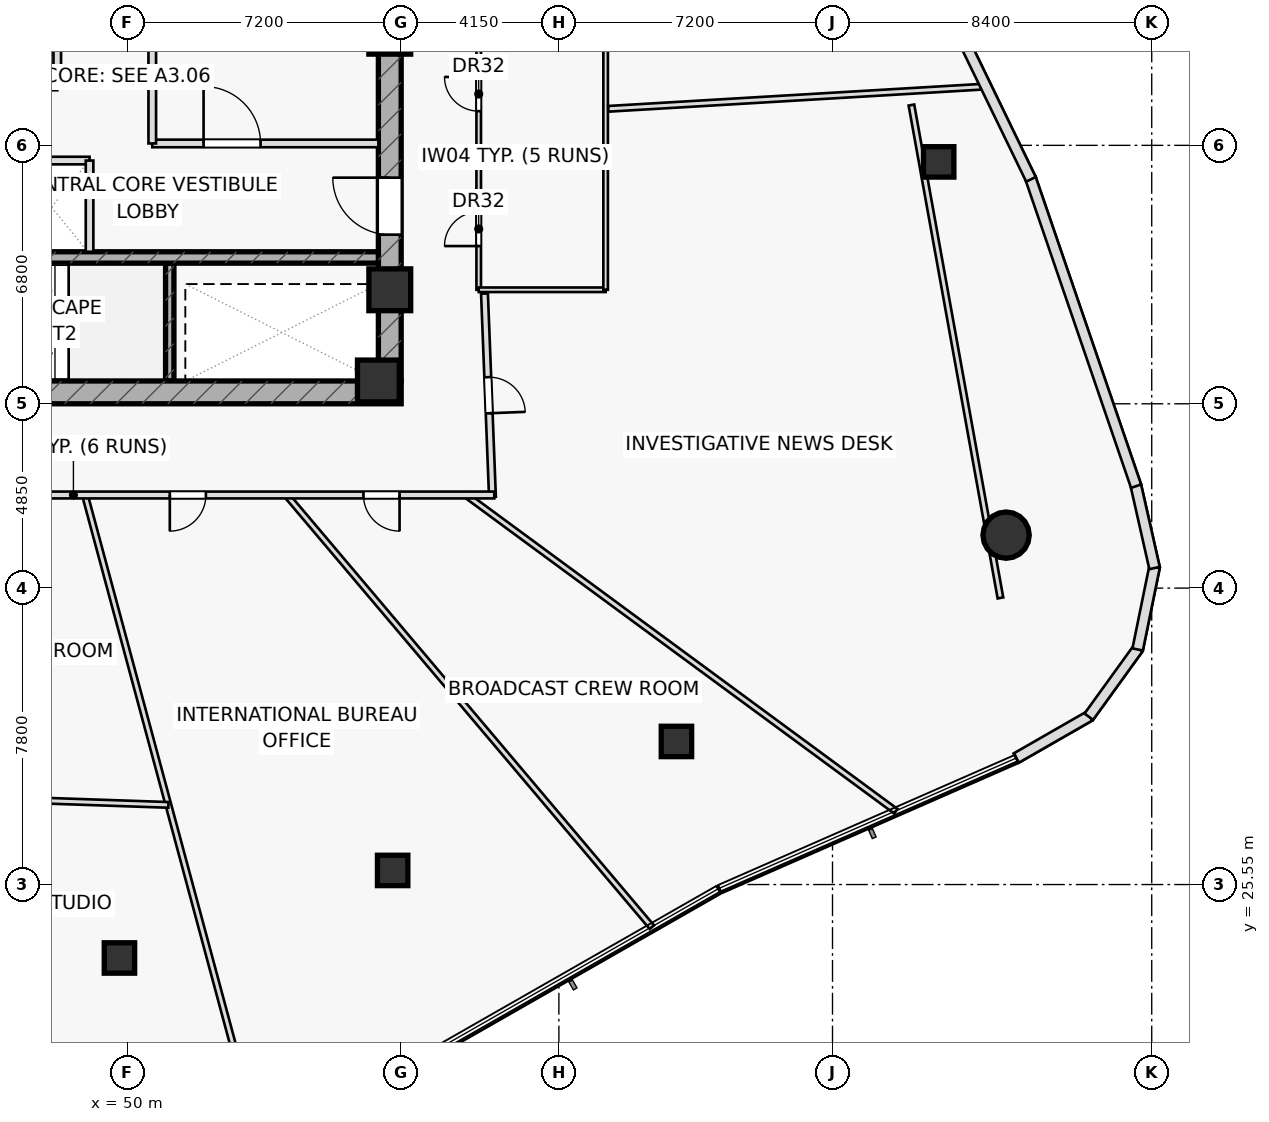
"""IFC4 building model, lengths in metres.
Left out: names, types, materials, properties, quantities, classifications, styles, units other than length and angle.
Written with IfcOpenShell. Run it as: python <this file> out.ifc"""

import sys

from ifc_helpers import new_model, si_unit, direction, frame, frame_2d, origin, origin_2d, place, context, subcontext, project, spatial, rectangle, hollow_rectangle, hollow_circle, extrude, element, fill, save


model = new_model("IFC4")
c1 = context("Model", 3, precision=1e-05, world=origin(), true_north=direction((0.0, 1.0)))
c2 = subcontext(c1, "Body", "Model", "MODEL_VIEW")
j1 = project(units=[si_unit("LENGTHUNIT", "METRE"), si_unit("PLANEANGLEUNIT", "RADIAN")], contexts=[c1])
p1 = place(None, origin())
s1 = spatial("IfcSite", under=j1, at=p1, CompositionType="ELEMENT")
p2 = place(p1, origin())
s2 = spatial("IfcBuilding", under=s1, at=p2, CompositionType="ELEMENT")
p3 = place(p2, frame((0.0, 0.0, 51.0)))
s3 = spatial("IfcBuildingStorey", under=s2, at=p3, CompositionType="ELEMENT", Elevation=51.0)
p4 = place(p3, frame((51.11, 38.8, 0.0), z_axis=(0.0, 0.0, 1.0), x_axis=(0.0, 1.0, 0.0)))
e1 = element("IfcWall", 1, at=p4, inside=s3, PredefinedType="SHEAR", context=c2, shape_type="SweptSolid", body=[
    extrude(rectangle(XDim=3.1, YDim=0.22, at=frame_2d((1.55, 0.0))), origin(), (0.0, 0.0, 1.0), 3.6),
])
p5 = place(p3, frame((42.8, 38.5, 0.0), z_axis=(0.0, 0.0, 1.0), x_axis=(1.0, 0.0, 0.0)))
e2 = element("IfcWall", 2, at=p5, inside=s3, PredefinedType="SHEAR", context=c2, shape_type="SweptSolid", body=[
    extrude(rectangle(XDim=14.4, YDim=0.6, at=frame_2d((7.2, 0.0))), origin(), (0.0, 0.0, 1.0), 3.6),
])
p6 = place(p5, frame((0.88, 0.0, 0.0)))
e3 = element("IfcOpeningElement", 3, at=p6, cuts=e2, PredefinedType="OPENING", context=c2, shape_type="SweptSolid", body=[
    extrude(rectangle(XDim=1.05, YDim=2.2, at=frame_2d((0.525, 1.1))), frame((0.0, 0.31, 0.0), z_axis=(0.0, -1.0, 0.0), x_axis=(1.0, 0.0, 0.0)), (0.0, 0.0, 1.0), 0.62),
])
p7 = place(p3, frame((56.9, 38.8, 0.0), z_axis=(0.0, 0.0, 1.0), x_axis=(0.0, 1.0, 0.0)))
e4 = element("IfcWall", 4, at=p7, inside=s3, PredefinedType="SHEAR", context=c2, shape_type="SweptSolid", body=[
    extrude(rectangle(XDim=12.4, YDim=0.6, at=frame_2d((6.2, 0.0))), origin(), (0.0, 0.0, 1.0), 3.6),
])
p8 = place(p7, frame((3.85, 0.0, 0.0)))
e5 = element("IfcOpeningElement", 5, at=p8, cuts=e4, PredefinedType="OPENING", context=c2, shape_type="SweptSolid", body=[
    extrude(rectangle(XDim=1.5, YDim=2.2, at=frame_2d((0.75, 1.1))), frame((0.0, 0.31, 0.0), z_axis=(0.0, -1.0, 0.0), x_axis=(1.0, 0.0, 0.0)), (0.0, 0.0, 1.0), 0.62),
])
p9 = place(p3, frame((43.4, 42.05, 0.0), z_axis=(0.0, 0.0, 1.0), x_axis=(1.0, 0.0, 0.0)))
e6 = element("IfcWall", 6, at=p9, inside=s3, PredefinedType="SHEAR", context=c2, shape_type="SweptSolid", body=[
    extrude(rectangle(XDim=13.2, YDim=0.3, at=frame_2d((6.6, 0.0))), origin(), (0.0, 0.0, 1.0), 3.6),
])
for number, where, z_axis, x_axis in (
    (7, (56.9, 47.95, 0.0), (0.0, 0.0, 1.0), (1.0, 0.0, 0.0)),
    (8, (56.9, 41.2, 0.0), (0.0, 0.0, 1.0), (1.0, 0.0, 0.0)),
    (9, (56.6, 38.8, 0.0), (0.0, 0.0, 1.0), (1.0, 0.0, 0.0)),
):
    element("IfcColumn", number, at=place(p3, frame(where, z_axis=z_axis, x_axis=x_axis)), inside=s3, PredefinedType="COLUMN", context=c2, shape_type="SweptSolid", body=[
        extrude(rectangle(XDim=1.1, YDim=1.1, at=origin_2d()), origin(), (0.0, 0.0, 1.0), 3.6),
    ])
for number, where, z_axis, x_axis in (
    (10, (49.787, 23.618, 0.0), (0.0, 0.0, 1.0), (1.0, 0.0, 0.0)),
    (11, (56.975, 25.921, 0.0), (0.0, 0.0, 1.0), (1.0, 0.0, 0.0)),
    (12, (64.444, 29.315, 0.0), (0.0, 0.0, 1.0), (1.0, 0.0, 0.0)),
):
    element("IfcColumn", number, at=place(p3, frame(where, z_axis=z_axis, x_axis=x_axis)), inside=s3, PredefinedType="COLUMN", context=c2, shape_type="SweptSolid", body=[
        extrude(hollow_rectangle(XDim=0.8, YDim=0.8, WallThickness=0.045, at=origin_2d()), origin(), (0.0, 0.0, 1.0), 3.6),
    ])
p10 = place(p3, frame((73.118, 34.744, 0.0), z_axis=(0.0, 0.0, 1.0), x_axis=(1.0, 0.0, 0.0)))
e13 = element("IfcColumn", 13, at=p10, inside=s3, PredefinedType="COLUMN", context=c2, shape_type="SweptSolid", body=[
    extrude(hollow_circle(Radius=0.61, WallThickness=0.05, at=origin_2d()), origin(), (0.0, 0.0, 1.0), 3.6),
])
p11 = place(p3, frame((71.344, 44.565, 0.0), z_axis=(0.0, 0.0, 1.0), x_axis=(1.0, 0.0, 0.0)))
e14 = element("IfcColumn", 14, at=p11, inside=s3, PredefinedType="COLUMN", context=c2, shape_type="SweptSolid", body=[
    extrude(hollow_rectangle(XDim=0.8, YDim=0.8, WallThickness=0.045, at=origin_2d()), origin(), (0.0, 0.0, 1.0), 3.6),
])
p12 = place(p3, frame((45.75, 46.55, 0.0), z_axis=(0.0, 0.0, 1.0), x_axis=(1.0, 0.0, 0.0)))
e15 = element("IfcWall", 15, at=p12, inside=s3, PredefinedType="PARTITIONING", context=c2, shape_type="SweptSolid", body=[
    extrude(rectangle(XDim=2.4, YDim=0.2, at=frame_2d((1.2, 0.0))), origin(), (0.0, 0.0, 1.0), 3.6),
])
p13 = place(p3, frame((48.15, 46.55, 0.0), z_axis=(0.0, 0.0, 1.0), x_axis=(0.0, 1.0, 0.0)))
e16 = element("IfcWall", 16, at=p13, inside=s3, PredefinedType="PARTITIONING", context=c2, shape_type="SweptSolid", body=[
    extrude(rectangle(XDim=1.25, YDim=0.2, at=frame_2d((0.625, 0.0))), origin(), (0.0, 0.0, 1.0), 3.6),
])
p14 = place(p3, frame((46.95, 44.6, 0.0), z_axis=(0.0, 0.0, 1.0), x_axis=(1.0, 0.0, 0.0)))
e17 = element("IfcWall", 17, at=p14, inside=s3, PredefinedType="PARTITIONING", context=c2, shape_type="SweptSolid", body=[
    extrude(rectangle(XDim=2.05, YDim=0.2, at=frame_2d((1.025, 0.0))), origin(), (0.0, 0.0, 1.0), 3.6),
])
p15 = place(p3, frame((50.65, 45.05, 0.0), z_axis=(0.0, 0.0, 1.0), x_axis=(1.0, 0.0, 0.0)))
e18 = element("IfcWall", 18, at=p15, inside=s3, PredefinedType="PARTITIONING", context=c2, shape_type="SweptSolid", body=[
    extrude(rectangle(XDim=5.95, YDim=0.2, at=frame_2d((2.975, 0.0))), origin(), (0.0, 0.0, 1.0), 3.6),
])
p16 = place(p15, frame((1.35, 0.0, 0.0)))
e19 = element("IfcOpeningElement", 19, at=p16, cuts=e18, PredefinedType="OPENING", context=c2, shape_type="SweptSolid", body=[
    extrude(rectangle(XDim=1.5, YDim=2.2, at=frame_2d((0.75, 1.1))), frame((0.0, 0.11, 0.0), z_axis=(0.0, -1.0, 0.0), x_axis=(1.0, 0.0, 0.0)), (0.0, 0.0, 1.0), 0.22),
])
p17 = place(p3, frame((50.65, 45.05, 0.0), z_axis=(0.0, 0.0, 1.0), x_axis=(0.0, 1.0, 0.0)))
e20 = element("IfcWall", 20, at=p17, inside=s3, PredefinedType="PARTITIONING", context=c2, shape_type="SweptSolid", body=[
    extrude(rectangle(XDim=2.75, YDim=0.2, at=frame_2d((1.375, 0.0))), origin(), (0.0, 0.0, 1.0), 3.6),
])
p18 = place(p3, frame((72.969, 33.091, 0.0), z_axis=(0.0, 0.0, 1.0), x_axis=(-0.177742578179, 0.984077017261, 0.0)))
e21 = element("IfcWall", 21, at=p18, inside=s3, PredefinedType="PARTITIONING", context=c2, shape_type="SweptSolid", body=[
    extrude(rectangle(XDim=13.179, YDim=0.15, at=frame_2d((6.59, 0.0))), origin(), (0.0, 0.0, 1.0), 2.925),
])
p19 = place(p3, frame((59.24, 41.2, 0.0), z_axis=(0.0, 0.0, 1.0), x_axis=(0.0, 1.0, 0.0)))
e22 = element("IfcWall", 22, at=p19, inside=s3, PredefinedType="PARTITIONING", context=c2, shape_type="SweptSolid", body=[
    extrude(rectangle(XDim=7.0, YDim=0.12, at=frame_2d((3.5, 0.0))), origin(), (0.0, 0.0, 1.0), 3.6),
])
p20 = place(p19, frame((1.15, 0.0, 0.0)))
e23 = element("IfcOpeningElement", 23, at=p20, cuts=e22, PredefinedType="OPENING", context=c2, shape_type="SweptSolid", body=[
    extrude(rectangle(XDim=0.9, YDim=2.05, at=frame_2d((0.45, 1.025))), frame((0.0, 0.07, 0.0), z_axis=(0.0, -1.0, 0.0), x_axis=(1.0, 0.0, 0.0)), (0.0, 0.0, 1.0), 0.14),
])
p21 = place(p19, frame((4.7, 0.0, 0.0)))
e24 = element("IfcOpeningElement", 24, at=p21, cuts=e22, PredefinedType="OPENING", context=c2, shape_type="SweptSolid", body=[
    extrude(rectangle(XDim=0.9, YDim=2.05, at=frame_2d((0.45, 1.025))), frame((0.0, 0.07, 0.0), z_axis=(0.0, -1.0, 0.0), x_axis=(1.0, 0.0, 0.0)), (0.0, 0.0, 1.0), 0.14),
])
p22 = place(p3, frame((59.24, 41.2, 0.0), z_axis=(0.0, 0.0, 1.0), x_axis=(1.0, 0.0, 0.0)))
e25 = element("IfcWall", 25, at=p22, inside=s3, PredefinedType="PARTITIONING", context=c2, shape_type="SweptSolid", body=[
    extrude(rectangle(XDim=3.34, YDim=0.12, at=frame_2d((1.67, 0.0))), origin(), (0.0, 0.0, 1.0), 2.925),
])
p23 = place(p3, frame((59.24, 44.65, 0.0), z_axis=(0.0, 0.0, 1.0), x_axis=(1.0, 0.0, 0.0)))
e26 = element("IfcWall", 26, at=p23, inside=s3, PredefinedType="PARTITIONING", context=c2, shape_type="SweptSolid", body=[
    extrude(rectangle(XDim=3.34, YDim=0.12, at=frame_2d((1.67, 0.0))), origin(), (0.0, 0.0, 1.0), 3.6),
])
p24 = place(p3, frame((62.58, 41.2, 0.0), z_axis=(0.0, 0.0, 1.0), x_axis=(0.0, 1.0, 0.0)))
e27 = element("IfcWall", 27, at=p24, inside=s3, PredefinedType="PARTITIONING", context=c2, shape_type="SweptSolid", body=[
    extrude(rectangle(XDim=7.0, YDim=0.12, at=frame_2d((3.5, 0.0))), origin(), (0.0, 0.0, 1.0), 3.6),
])
p25 = place(p3, frame((48.878, 35.8, 0.0), z_axis=(0.0, 0.0, 1.0), x_axis=(0.260103938271, -0.965580623923, 0.0)))
e28 = element("IfcWall", 28, at=p25, inside=s3, PredefinedType="PARTITIONING", context=c2, shape_type="SweptSolid", body=[
    extrude(rectangle(XDim=16.24, YDim=0.15, at=frame_2d((8.12, 0.0))), origin(), (0.0, 0.0, 1.0), 2.975),
])
p26 = place(p3, frame((54.18, 35.8, 0.0), z_axis=(0.0, 0.0, 1.0), x_axis=(0.645721016033, -0.763573421128, 0.0)))
e29 = element("IfcWall", 29, at=p26, inside=s3, PredefinedType="PARTITIONING", context=c2, shape_type="SweptSolid", body=[
    extrude(rectangle(XDim=14.893, YDim=0.15, at=frame_2d((7.446, 0.0))), origin(), (0.0, 0.0, 1.0), 2.925),
])
p27 = place(p3, frame((58.906, 35.8, 0.0), z_axis=(0.0, 0.0, 1.0), x_axis=(0.805507004142, -0.592586252184, 0.0)))
e30 = element("IfcWall", 30, at=p27, inside=s3, PredefinedType="PARTITIONING", context=c2, shape_type="SweptSolid", body=[
    extrude(rectangle(XDim=14.043, YDim=0.15, at=frame_2d((7.021, 0.0))), origin(), (0.0, 0.0, 1.0), 2.925),
])
p28 = place(p3, frame((62.65, 45.961, 0.0), z_axis=(0.0, 0.0, 1.0), x_axis=(0.99825565381, 0.059039390554, 0.0)))
e31 = element("IfcWall", 31, at=p28, inside=s3, PredefinedType="PARTITIONING", context=c2, shape_type="SweptSolid", body=[
    extrude(rectangle(XDim=9.966, YDim=0.15, at=frame_2d((4.983, 0.0))), origin(), (0.0, 0.0, 1.0), 2.975),
])
p29 = place(p3, frame((37.938, 28.096, 0.0), z_axis=(0.0, 0.0, 1.0), x_axis=(0.999413957747, -0.034230703491, 0.0)))
e32 = element("IfcWall", 32, at=p29, inside=s3, PredefinedType="PARTITIONING", context=c2, shape_type="SweptSolid", body=[
    extrude(rectangle(XDim=13.145, YDim=0.15, at=frame_2d((6.572, 0.0))), origin(), (0.0, 0.0, 1.0), 2.925),
])
p30 = place(p29, frame((6.097, 0.0, 0.0)))
e33 = element("IfcOpeningElement", 33, at=p30, cuts=e32, PredefinedType="OPENING", context=c2, shape_type="SweptSolid", body=[
    extrude(rectangle(XDim=0.95, YDim=2.05, at=frame_2d((0.475, 1.025))), frame((0.0, 0.085, 0.0), z_axis=(0.0, -1.0, 0.0), x_axis=(1.0, 0.0, 0.0)), (0.0, 0.0, 1.0), 0.17),
])
p31 = place(p3, frame((59.392, 41.1, 0.0), z_axis=(0.0, 0.0, 1.0), x_axis=(0.03921413315, -0.999230830069, 0.0)))
e34 = element("IfcWall", 34, at=p31, inside=s3, PredefinedType="PARTITIONING", context=c2, shape_type="SweptSolid", body=[
    extrude(rectangle(XDim=5.354, YDim=0.18, at=frame_2d((2.677, 0.0))), origin(), (0.0, 0.0, 1.0), 2.925),
])
p32 = place(p31, frame((2.202, 0.0, 0.0)))
e35 = element("IfcOpeningElement", 35, at=p32, cuts=e34, PredefinedType="OPENING", context=c2, shape_type="SweptSolid", body=[
    extrude(rectangle(XDim=0.95, YDim=2.05, at=frame_2d((0.475, 1.025))), frame((0.0, 0.1, 0.0), z_axis=(0.0, -1.0, 0.0), x_axis=(1.0, 0.0, 0.0)), (0.0, 0.0, 1.0), 0.2),
])
p33 = place(p3, frame((59.65, 35.8, 0.0), z_axis=(0.0, 0.0, 1.0), x_axis=(-1.0, 0.0, 0.0)))
e36 = element("IfcWall", 36, at=p33, inside=s3, PredefinedType="PARTITIONING", context=c2, shape_type="SweptSolid", body=[
    extrude(rectangle(XDim=22.15, YDim=0.18, at=frame_2d((11.075, 0.0))), origin(), (0.0, 0.0, 1.0), 2.925),
])
p34 = place(p33, frame((2.493, 0.0, 0.0)))
e37 = element("IfcOpeningElement", 37, at=p34, cuts=e36, PredefinedType="OPENING", context=c2, shape_type="SweptSolid", body=[
    extrude(rectangle(XDim=0.95, YDim=2.05, at=frame_2d((0.475, 1.025))), frame((0.0, 0.1, 0.0), z_axis=(0.0, -1.0, 0.0), x_axis=(1.0, 0.0, 0.0)), (0.0, 0.0, 1.0), 0.2),
])
p35 = place(p33, frame((7.588, 0.0, 0.0)))
e38 = element("IfcOpeningElement", 38, at=p35, cuts=e36, PredefinedType="OPENING", context=c2, shape_type="SweptSolid", body=[
    extrude(rectangle(XDim=0.95, YDim=2.05, at=frame_2d((0.475, 1.025))), frame((0.0, 0.1, 0.0), z_axis=(0.0, -1.0, 0.0), x_axis=(1.0, 0.0, 0.0)), (0.0, 0.0, 1.0), 0.2),
])
p36 = place(p33, frame((13.848, 0.0, 0.0)))
e39 = element("IfcOpeningElement", 39, at=p36, cuts=e36, PredefinedType="OPENING", context=c2, shape_type="SweptSolid", body=[
    extrude(rectangle(XDim=0.95, YDim=2.05, at=frame_2d((0.475, 1.025))), frame((0.0, 0.1, 0.0), z_axis=(0.0, -1.0, 0.0), x_axis=(1.0, 0.0, 0.0)), (0.0, 0.0, 1.0), 0.2),
])
p37 = place(p3, frame((73.384, 28.877, 0.0), z_axis=(0.0, 0.0, 1.0), x_axis=(0.867338075625, 0.497719461717, 0.0)))
e40 = element("IfcWall", 40, at=p37, inside=s3, PredefinedType="STANDARD", context=c2, shape_type="SweptSolid", body=[
    extrude(rectangle(XDim=2.228, YDim=0.28, at=frame_2d((1.114, 0.0))), origin(), (0.0, 0.0, 1.0), 3.6),
])
for number, where, z_axis, x_axis in (
    (41, (75.294, 29.967, 0.0), (0.0, 0.0, 1.0), (0.586, 0.811, 0.0)),
    (42, (76.58, 31.736, 0.0), (0.0, 0.0, 1.0), (0.2, 0.98, 0.0)),
):
    element("IfcWall", number, at=place(p3, frame(where, z_axis=z_axis, x_axis=x_axis)), inside=s3, PredefinedType="STANDARD", context=c2, shape_type="SweptSolid", body=[
        extrude(rectangle(XDim=2.216, YDim=0.28, at=frame_2d((1.108, 0.0))), origin(), (0.0, 0.0, 1.0), 3.6),
    ])
p38 = place(p3, frame((77.024, 33.878, 0.0), z_axis=(0.0, 0.0, 1.0), x_axis=(-0.220716047847, 0.975338108669, 0.0)))
e43 = element("IfcWall", 43, at=p38, inside=s3, PredefinedType="STANDARD", context=c2, shape_type="SweptSolid", body=[
    extrude(rectangle(XDim=2.239, YDim=0.28, at=frame_2d((1.119, 0.0))), origin(), (0.0, 0.0, 1.0), 3.6),
])
p39 = place(p3, frame((76.538, 36.032, 0.0), z_axis=(0.0, 0.0, 1.0), x_axis=(-0.324289341757, 0.945957939246, 0.0)))
e44 = element("IfcWall", 44, at=p39, inside=s3, PredefinedType="STANDARD", context=c2, shape_type="SweptSolid", body=[
    extrude(rectangle(XDim=8.564, YDim=0.28, at=frame_2d((4.282, 0.0))), origin(), (0.0, 0.0, 1.0), 3.6),
])
p40 = place(p3, frame((73.772, 44.106, 0.0), z_axis=(0.0, 0.0, 1.0), x_axis=(-0.436413579007, 0.899746179796, 0.0)))
e45 = element("IfcWall", 45, at=p40, inside=s3, PredefinedType="STANDARD", context=c2, shape_type="SweptSolid", body=[
    extrude(rectangle(XDim=8.552, YDim=0.28, at=frame_2d((4.276, 0.0))), origin(), (0.0, 0.0, 1.0), 3.6),
])
p41 = place(p3, frame((49.0, 42.2, 0.0), z_axis=(0.0, 0.0, 1.0), x_axis=(0.0, 1.0, 0.0)))
e46 = element("IfcWall", 46, at=p41, inside=s3, PredefinedType="PARTITIONING", context=c2, shape_type="SweptSolid", body=[
    extrude(rectangle(XDim=2.4, YDim=0.2, at=frame_2d((1.2, 0.0))), origin(), (0.0, 0.0, 1.0), 3.6),
])
p42 = place(p8, origin())
e47 = element("IfcDoor", 47, at=p42, inside=s3, OperationType="SINGLE_SWING_RIGHT", PredefinedType="DOOR", context=c2, shape_type="SweptSolid", body=[
    extrude(rectangle(XDim=1.5, YDim=2.2, at=frame_2d((0.75, 1.1))), frame((0.0, 0.025, 0.0), z_axis=(0.0, -1.0, 0.0), x_axis=(1.0, 0.0, 0.0)), (0.0, 0.0, 1.0), 0.05),
])
fill(e5, e47)
p43 = place(p16, origin())
e48 = element("IfcDoor", 48, at=p43, inside=s3, OperationType="SINGLE_SWING_LEFT", PredefinedType="DOOR", context=c2, shape_type="SweptSolid", body=[
    extrude(rectangle(XDim=1.5, YDim=2.2, at=frame_2d((0.75, 1.1))), frame((0.0, 0.025, 0.0), z_axis=(0.0, -1.0, 0.0), x_axis=(1.0, 0.0, 0.0)), (0.0, 0.0, 1.0), 0.05),
])
fill(e19, e48)
p44 = place(p20, origin())
e49 = element("IfcDoor", 49, at=p44, inside=s3, OperationType="SINGLE_SWING_LEFT", PredefinedType="DOOR", context=c2, shape_type="SweptSolid", body=[
    extrude(rectangle(XDim=0.9, YDim=2.05, at=frame_2d((0.45, 1.025))), frame((0.0, 0.025, 0.0), z_axis=(0.0, -1.0, 0.0), x_axis=(1.0, 0.0, 0.0)), (0.0, 0.0, 1.0), 0.05),
])
fill(e23, e49)
p45 = place(p21, origin())
e50 = element("IfcDoor", 50, at=p45, inside=s3, OperationType="SINGLE_SWING_RIGHT", PredefinedType="DOOR", context=c2, shape_type="SweptSolid", body=[
    extrude(rectangle(XDim=0.9, YDim=2.05, at=frame_2d((0.45, 1.025))), frame((0.0, 0.025, 0.0), z_axis=(0.0, -1.0, 0.0), x_axis=(1.0, 0.0, 0.0)), (0.0, 0.0, 1.0), 0.05),
])
fill(e24, e50)
p46 = place(p32, origin())
e51 = element("IfcDoor", 51, at=p46, inside=s3, OperationType="SINGLE_SWING_RIGHT", PredefinedType="DOOR", context=c2, shape_type="SweptSolid", body=[
    extrude(rectangle(XDim=0.95, YDim=2.05, at=frame_2d((0.475, 1.025))), frame((0.0, 0.025, 0.0), z_axis=(0.0, -1.0, 0.0), x_axis=(1.0, 0.0, 0.0)), (0.0, 0.0, 1.0), 0.05),
])
fill(e35, e51)
p47 = place(p34, origin())
e52 = element("IfcDoor", 52, at=p47, inside=s3, OperationType="SINGLE_SWING_LEFT", PredefinedType="DOOR", context=c2, shape_type="SweptSolid", body=[
    extrude(rectangle(XDim=0.95, YDim=2.05, at=frame_2d((0.475, 1.025))), frame((0.0, 0.025, 0.0), z_axis=(0.0, -1.0, 0.0), x_axis=(1.0, 0.0, 0.0)), (0.0, 0.0, 1.0), 0.05),
])
fill(e37, e52)
p48 = place(p35, origin())
e53 = element("IfcDoor", 53, at=p48, inside=s3, OperationType="SINGLE_SWING_RIGHT", PredefinedType="DOOR", context=c2, shape_type="SweptSolid", body=[
    extrude(rectangle(XDim=0.95, YDim=2.05, at=frame_2d((0.475, 1.025))), frame((0.0, 0.025, 0.0), z_axis=(0.0, -1.0, 0.0), x_axis=(1.0, 0.0, 0.0)), (0.0, 0.0, 1.0), 0.05),
])
fill(e38, e53)
save(model, sys.argv[1])
